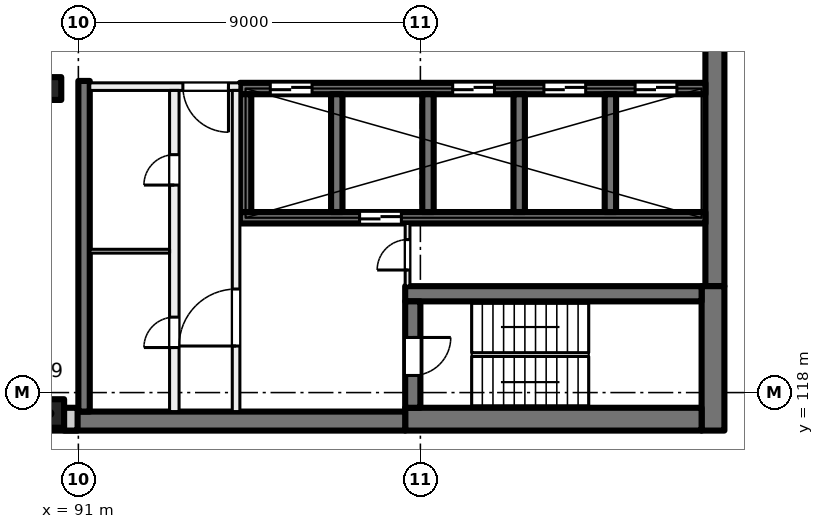
"""IFC4 building model, lengths in metres.
Left out: names, types, materials, properties, quantities, classifications, styles, units other than length and angle.
Written with IfcOpenShell. Run it as: python <this file> out.ifc"""

import sys

from ifc_helpers import new_model, si_unit, direction, frame, frame_2d, origin, origin_2d, place, context, subcontext, project, spatial, rectangle, extrude, element, fill, save


model = new_model("IFC4")
c1 = context("Model", 3, precision=1e-05, world=origin(), true_north=direction((0.0, 1.0)))
c2 = subcontext(c1, "Body", "Model", "MODEL_VIEW")
j1 = project(units=[si_unit("LENGTHUNIT", "METRE"), si_unit("PLANEANGLEUNIT", "RADIAN")], contexts=[c1])
p1 = place(None, origin())
s1 = spatial("IfcSite", under=j1, at=p1, CompositionType="ELEMENT")
p2 = place(p1, origin())
s2 = spatial("IfcBuilding", under=s1, at=p2, CompositionType="ELEMENT")
p3 = place(p2, frame((0.0, 0.0, 232.0)))
s3 = spatial("IfcBuildingStorey", under=s2, at=p3, CompositionType="ELEMENT", Elevation=232.0)
p4 = place(p3, frame((90.25, 126.0, 0.0), z_axis=(0.0, 0.0, 1.0), x_axis=(1.0, 0.0, 0.0)))
e1 = element("IfcColumn", 1, at=p4, inside=s3, PredefinedType="COLUMN", context=c2, shape_type="SweptSolid", body=[
    extrude(rectangle(XDim=0.6, YDim=0.6, at=origin_2d()), origin(), (0.0, 0.0, 1.0), 4.0),
])
p5 = place(p3, frame((90.25, 117.45, 0.0), z_axis=(0.0, 0.0, 1.0), x_axis=(1.0, 0.0, 0.0)))
e2 = element("IfcColumn", 2, at=p5, inside=s3, PredefinedType="COLUMN", context=c2, shape_type="SweptSolid", body=[
    extrude(rectangle(XDim=0.75, YDim=0.75, at=origin_2d()), origin(), (0.0, 0.0, 1.0), 4.0),
])
p6 = place(p3, frame((107.75, 135.2, 0.0), z_axis=(0.0, 0.0, 1.0), x_axis=(0.0, -1.0, 0.0)))
e3 = element("IfcWall", 3, at=p6, inside=s3, PredefinedType="SHEAR", context=c2, shape_type="SweptSolid", body=[
    extrude(rectangle(XDim=14.4, YDim=0.5, at=frame_2d((7.2, 0.0))), origin(), (0.0, 0.0, 1.0), 4.0),
])
p7 = place(p3, frame((107.7, 120.8, 0.0), z_axis=(0.0, 0.0, 1.0), x_axis=(0.0, -1.0, 0.0)))
e4 = element("IfcWall", 4, at=p7, inside=s3, PredefinedType="SHEAR", context=c2, shape_type="SweptSolid", body=[
    extrude(rectangle(XDim=3.8, YDim=0.6, at=frame_2d((1.9, 0.0))), origin(), (0.0, 0.0, 1.0), 4.0),
])
p8 = place(p3, frame((107.4, 117.3, 0.0), z_axis=(0.0, 0.0, 1.0), x_axis=(-1.0, 0.0, 0.0)))
e5 = element("IfcWall", 5, at=p8, inside=s3, PredefinedType="SHEAR", context=c2, shape_type="SweptSolid", body=[
    extrude(rectangle(XDim=7.8, YDim=0.6, at=frame_2d((3.9, 0.0))), origin(), (0.0, 0.0, 1.0), 4.0),
])
p9 = place(p3, frame((99.6, 117.25, 0.0), z_axis=(0.0, 0.0, 1.0), x_axis=(-1.0, 0.0, 0.0)))
e6 = element("IfcWall", 6, at=p9, inside=s3, PredefinedType="SHEAR", context=c2, shape_type="SweptSolid", body=[
    extrude(rectangle(XDim=8.975, YDim=0.5, at=frame_2d((4.488, 0.0))), origin(), (0.0, 0.0, 1.0), 4.0),
])
p10 = place(p3, frame((107.4, 120.6, 0.0), z_axis=(0.0, 0.0, 1.0), x_axis=(-1.0, 0.0, 0.0)))
e7 = element("IfcWall", 7, at=p10, inside=s3, PredefinedType="SHEAR", context=c2, shape_type="SweptSolid", body=[
    extrude(rectangle(XDim=7.8, YDim=0.4, at=frame_2d((3.9, 0.0))), origin(), (0.0, 0.0, 1.0), 4.0),
])
p11 = place(p3, frame((99.8, 120.4, 0.0), z_axis=(0.0, 0.0, 1.0), x_axis=(0.0, -1.0, 0.0)))
e8 = element("IfcWall", 8, at=p11, inside=s3, PredefinedType="SHEAR", context=c2, shape_type="SweptSolid", body=[
    extrude(rectangle(XDim=2.8, YDim=0.4, at=frame_2d((1.4, 0.0))), origin(), (0.0, 0.0, 1.0), 4.0),
])
p12 = place(p11, frame((0.95, 0.0, 0.0)))
e9 = element("IfcOpeningElement", 9, at=p12, cuts=e8, PredefinedType="OPENING", context=c2, shape_type="SweptSolid", body=[
    extrude(rectangle(XDim=1.0, YDim=2.1, at=frame_2d((0.5, 1.05))), frame((0.0, 0.21, 0.0), z_axis=(0.0, -1.0, 0.0), x_axis=(1.0, 0.0, 0.0)), (0.0, 0.0, 1.0), 0.42),
])
p13 = place(p3, frame((107.5, 126.0, 0.0), z_axis=(0.0, 0.0, 1.0), x_axis=(-1.0, 0.0, 0.0)))
e10 = element("IfcWall", 10, at=p13, inside=s3, PredefinedType="SHEAR", context=c2, shape_type="SweptSolid", body=[
    extrude(rectangle(XDim=12.25, YDim=0.3, at=frame_2d((6.125, 0.0))), origin(), (0.0, 0.0, 1.0), 4.0),
])
p14 = place(p13, frame((0.75, 0.0, 0.0)))
e11 = element("IfcOpeningElement", 11, at=p14, cuts=e10, PredefinedType="OPENING", context=c2, shape_type="SweptSolid", body=[
    extrude(rectangle(XDim=1.1, YDim=2.1, at=frame_2d((0.55, 1.05))), frame((0.0, 0.16, 0.0), z_axis=(0.0, -1.0, 0.0), x_axis=(1.0, 0.0, 0.0)), (0.0, 0.0, 1.0), 0.32),
])
p15 = place(p13, frame((3.15, 0.0, 0.0)))
e12 = element("IfcOpeningElement", 12, at=p15, cuts=e10, PredefinedType="OPENING", context=c2, shape_type="SweptSolid", body=[
    extrude(rectangle(XDim=1.1, YDim=2.1, at=frame_2d((0.55, 1.05))), frame((0.0, 0.16, 0.0), z_axis=(0.0, -1.0, 0.0), x_axis=(1.0, 0.0, 0.0)), (0.0, 0.0, 1.0), 0.32),
])
p16 = place(p13, frame((5.55, 0.0, 0.0)))
e13 = element("IfcOpeningElement", 13, at=p16, cuts=e10, PredefinedType="OPENING", context=c2, shape_type="SweptSolid", body=[
    extrude(rectangle(XDim=1.1, YDim=2.1, at=frame_2d((0.55, 1.05))), frame((0.0, 0.16, 0.0), z_axis=(0.0, -1.0, 0.0), x_axis=(1.0, 0.0, 0.0)), (0.0, 0.0, 1.0), 0.32),
])
p17 = place(p13, frame((10.35, 0.0, 0.0)))
e14 = element("IfcOpeningElement", 14, at=p17, cuts=e10, PredefinedType="OPENING", context=c2, shape_type="SweptSolid", body=[
    extrude(rectangle(XDim=1.1, YDim=2.1, at=frame_2d((0.55, 1.05))), frame((0.0, 0.16, 0.0), z_axis=(0.0, -1.0, 0.0), x_axis=(1.0, 0.0, 0.0)), (0.0, 0.0, 1.0), 0.32),
])
p18 = place(p3, frame((107.5, 122.6, 0.0), z_axis=(0.0, 0.0, 1.0), x_axis=(-1.0, 0.0, 0.0)))
e15 = element("IfcWall", 15, at=p18, inside=s3, PredefinedType="SHEAR", context=c2, shape_type="SweptSolid", body=[
    extrude(rectangle(XDim=12.25, YDim=0.3, at=frame_2d((6.125, 0.0))), origin(), (0.0, 0.0, 1.0), 4.0),
])
p19 = place(p18, frame((8.0, 0.0, 0.0)))
e16 = element("IfcOpeningElement", 16, at=p19, cuts=e15, PredefinedType="OPENING", context=c2, shape_type="SweptSolid", body=[
    extrude(rectangle(XDim=1.1, YDim=2.1, at=frame_2d((0.55, 1.05))), frame((0.0, 0.16, 0.0), z_axis=(0.0, -1.0, 0.0), x_axis=(1.0, 0.0, 0.0)), (0.0, 0.0, 1.0), 0.32),
])
for number, where, z_axis, x_axis in (
    (17, (105.0, 125.85, 0.0), (0.0, 0.0, 1.0), (0.0, -1.0, 0.0)),
    (18, (102.6, 125.85, 0.0), (0.0, 0.0, 1.0), (0.0, -1.0, 0.0)),
    (19, (100.2, 125.85, 0.0), (0.0, 0.0, 1.0), (0.0, -1.0, 0.0)),
    (20, (97.8, 125.85, 0.0), (0.0, 0.0, 1.0), (0.0, -1.0, 0.0)),
    (21, (95.4, 125.85, 0.0), (0.0, 0.0, 1.0), (0.0, -1.0, 0.0)),
):
    element("IfcWall", number, at=place(p3, frame(where, z_axis=z_axis, x_axis=x_axis)), inside=s3, PredefinedType="SHEAR", context=c2, shape_type="SweptSolid", body=[
        extrude(rectangle(XDim=3.1, YDim=0.3, at=frame_2d((1.55, 0.0))), origin(), (0.0, 0.0, 1.0), 4.0),
    ])
p20 = place(p3, frame((91.15, 126.2, 0.0), z_axis=(0.0, 0.0, 1.0), x_axis=(0.0, -1.0, 0.0)))
e22 = element("IfcWall", 22, at=p20, inside=s3, PredefinedType="SHEAR", context=c2, shape_type="SweptSolid", body=[
    extrude(rectangle(XDim=8.7, YDim=0.3, at=frame_2d((4.35, 0.0))), origin(), (0.0, 0.0, 1.0), 4.0),
])
p21 = place(p3, frame((90.98, 117.3, 0.0), z_axis=(0.0, 0.0, 1.0), x_axis=(-1.0, 0.0, 0.0)))
e23 = element("IfcWall", 23, at=p21, inside=s3, PredefinedType="SOLIDWALL", context=c2, shape_type="SweptSolid", body=[
    extrude(rectangle(XDim=33.745, YDim=0.6, at=frame_2d((16.873, 0.0))), origin(), (0.0, 0.0, 1.0), 3.625),
])
p22 = place(p21, frame((1.48, 0.0, 0.9)))
e24 = element("IfcOpeningElement", 24, at=p22, cuts=e23, PredefinedType="OPENING", context=c2, shape_type="SweptSolid", body=[
    extrude(rectangle(XDim=3.0, YDim=2.4, at=frame_2d((1.5, 1.2))), frame((0.0, 0.31, 0.0), z_axis=(0.0, -1.0, 0.0), x_axis=(1.0, 0.0, 0.0)), (0.0, 0.0, 1.0), 0.62),
])
p23 = place(p21, frame((5.98, 0.0, 0.9)))
e25 = element("IfcOpeningElement", 25, at=p23, cuts=e23, PredefinedType="OPENING", context=c2, shape_type="SweptSolid", body=[
    extrude(rectangle(XDim=3.0, YDim=2.4, at=frame_2d((1.5, 1.2))), frame((0.0, 0.31, 0.0), z_axis=(0.0, -1.0, 0.0), x_axis=(1.0, 0.0, 0.0)), (0.0, 0.0, 1.0), 0.62),
])
p24 = place(p21, frame((10.48, 0.0, 0.9)))
e26 = element("IfcOpeningElement", 26, at=p24, cuts=e23, PredefinedType="OPENING", context=c2, shape_type="SweptSolid", body=[
    extrude(rectangle(XDim=3.0, YDim=2.4, at=frame_2d((1.5, 1.2))), frame((0.0, 0.31, 0.0), z_axis=(0.0, -1.0, 0.0), x_axis=(1.0, 0.0, 0.0)), (0.0, 0.0, 1.0), 0.62),
])
p25 = place(p21, frame((14.98, 0.0, 0.9)))
e27 = element("IfcOpeningElement", 27, at=p25, cuts=e23, PredefinedType="OPENING", context=c2, shape_type="SweptSolid", body=[
    extrude(rectangle(XDim=3.0, YDim=2.4, at=frame_2d((1.5, 1.2))), frame((0.0, 0.31, 0.0), z_axis=(0.0, -1.0, 0.0), x_axis=(1.0, 0.0, 0.0)), (0.0, 0.0, 1.0), 0.62),
])
p26 = place(p21, frame((19.48, 0.0, 0.9)))
e28 = element("IfcOpeningElement", 28, at=p26, cuts=e23, PredefinedType="OPENING", context=c2, shape_type="SweptSolid", body=[
    extrude(rectangle(XDim=3.0, YDim=2.4, at=frame_2d((1.5, 1.2))), frame((0.0, 0.31, 0.0), z_axis=(0.0, -1.0, 0.0), x_axis=(1.0, 0.0, 0.0)), (0.0, 0.0, 1.0), 0.62),
])
p27 = place(p21, frame((23.98, 0.0, 0.9)))
e29 = element("IfcOpeningElement", 29, at=p27, cuts=e23, PredefinedType="OPENING", context=c2, shape_type="SweptSolid", body=[
    extrude(rectangle(XDim=3.0, YDim=2.4, at=frame_2d((1.5, 1.2))), frame((0.0, 0.31, 0.0), z_axis=(0.0, -1.0, 0.0), x_axis=(1.0, 0.0, 0.0)), (0.0, 0.0, 1.0), 0.62),
])
p28 = place(p21, frame((28.48, 0.0, 0.9)))
e30 = element("IfcOpeningElement", 30, at=p28, cuts=e23, PredefinedType="OPENING", context=c2, shape_type="SweptSolid", body=[
    extrude(rectangle(XDim=3.0, YDim=2.4, at=frame_2d((1.5, 1.2))), frame((0.0, 0.31, 0.0), z_axis=(0.0, -1.0, 0.0), x_axis=(1.0, 0.0, 0.0)), (0.0, 0.0, 1.0), 0.62),
])
p29 = place(p3, frame((95.25, 126.05, 0.0), z_axis=(0.0, 0.0, 1.0), x_axis=(-1.0, 0.0, 0.0)))
e31 = element("IfcWall", 31, at=p29, inside=s3, PredefinedType="PARTITIONING", context=c2, shape_type="SweptSolid", body=[
    extrude(rectangle(XDim=3.95, YDim=0.2, at=frame_2d((1.975, 0.0))), origin(), (0.0, 0.0, 1.0), 3.625),
])
p30 = place(p29, frame((0.3, 0.0, 0.0)))
e32 = element("IfcOpeningElement", 32, at=p30, cuts=e31, PredefinedType="OPENING", context=c2, shape_type="SweptSolid", body=[
    extrude(rectangle(XDim=1.2, YDim=2.1, at=frame_2d((0.6, 1.05))), frame((0.0, 0.11, 0.0), z_axis=(0.0, -1.0, 0.0), x_axis=(1.0, 0.0, 0.0)), (0.0, 0.0, 1.0), 0.22),
])
p31 = place(p3, frame((95.15, 117.5, 0.0), z_axis=(0.0, 0.0, 1.0), x_axis=(0.0, 1.0, 0.0)))
e33 = element("IfcWall", 33, at=p31, inside=s3, PredefinedType="PARTITIONING", context=c2, shape_type="SweptSolid", body=[
    extrude(rectangle(XDim=8.45, YDim=0.2, at=frame_2d((4.225, 0.0))), origin(), (0.0, 0.0, 1.0), 3.625),
])
p32 = place(p31, frame((1.725, 0.0, 0.0)))
e34 = element("IfcOpeningElement", 34, at=p32, cuts=e33, PredefinedType="OPENING", context=c2, shape_type="SweptSolid", body=[
    extrude(rectangle(XDim=1.5, YDim=2.1, at=frame_2d((0.75, 1.05))), frame((0.0, 0.11, 0.0), z_axis=(0.0, -1.0, 0.0), x_axis=(1.0, 0.0, 0.0)), (0.0, 0.0, 1.0), 0.22),
])
p33 = place(p3, frame((93.525, 117.5, 0.0), z_axis=(0.0, 0.0, 1.0), x_axis=(0.0, 1.0, 0.0)))
e35 = element("IfcWall", 35, at=p33, inside=s3, PredefinedType="PARTITIONING", context=c2, shape_type="SweptSolid", body=[
    extrude(rectangle(XDim=8.45, YDim=0.25, at=frame_2d((4.225, 0.0))), origin(), (0.0, 0.0, 1.0), 3.625),
])
p34 = place(p33, frame((5.96, 0.0, 0.0)))
e36 = element("IfcOpeningElement", 36, at=p34, cuts=e35, PredefinedType="OPENING", context=c2, shape_type="SweptSolid", body=[
    extrude(rectangle(XDim=0.8, YDim=2.1, at=frame_2d((0.4, 1.05))), frame((0.0, 0.135, 0.0), z_axis=(0.0, -1.0, 0.0), x_axis=(1.0, 0.0, 0.0)), (0.0, 0.0, 1.0), 0.27),
])
p35 = place(p33, frame((1.685, 0.0, 0.0)))
e37 = element("IfcOpeningElement", 37, at=p35, cuts=e35, PredefinedType="OPENING", context=c2, shape_type="SweptSolid", body=[
    extrude(rectangle(XDim=0.8, YDim=2.1, at=frame_2d((0.4, 1.05))), frame((0.0, 0.135, 0.0), z_axis=(0.0, -1.0, 0.0), x_axis=(1.0, 0.0, 0.0)), (0.0, 0.0, 1.0), 0.27),
])
p36 = place(p3, frame((99.663, 120.8, 0.0), z_axis=(0.0, 0.0, 1.0), x_axis=(0.0, 1.0, 0.0)))
e38 = element("IfcWall", 38, at=p36, inside=s3, PredefinedType="PARTITIONING", context=c2, shape_type="SweptSolid", body=[
    extrude(rectangle(XDim=1.65, YDim=0.125, at=frame_2d((0.825, 0.0))), origin(), (0.0, 0.0, 1.0), 3.625),
])
p37 = place(p36, frame((0.425, 0.0, 0.0)))
e39 = element("IfcOpeningElement", 39, at=p37, cuts=e38, PredefinedType="OPENING", context=c2, shape_type="SweptSolid", body=[
    extrude(rectangle(XDim=0.8, YDim=2.1, at=frame_2d((0.4, 1.05))), frame((0.0, 0.073, 0.0), z_axis=(0.0, -1.0, 0.0), x_axis=(1.0, 0.0, 0.0)), (0.0, 0.0, 1.0), 0.145),
])
p38 = place(p3, frame((93.4, 121.72, 0.0), z_axis=(0.0, 0.0, 1.0), x_axis=(-1.0, 0.0, 0.0)))
e40 = element("IfcWall", 40, at=p38, inside=s3, PredefinedType="PARTITIONING", context=c2, shape_type="SweptSolid", body=[
    extrude(rectangle(XDim=2.1, YDim=0.1, at=frame_2d((1.05, 0.0))), origin(), (0.0, 0.0, 1.0), 3.625),
])
p39 = place(p14, origin())
e41 = element("IfcDoor", 41, at=p39, inside=s3, OperationType="DOUBLE_DOOR_SLIDING", PredefinedType="DOOR", context=c2, shape_type="SweptSolid", body=[
    extrude(rectangle(XDim=1.1, YDim=2.1, at=frame_2d((0.55, 1.05))), frame((0.0, 0.025, 0.0), z_axis=(0.0, -1.0, 0.0), x_axis=(1.0, 0.0, 0.0)), (0.0, 0.0, 1.0), 0.05),
])
fill(e11, e41)
p40 = place(p15, origin())
e42 = element("IfcDoor", 42, at=p40, inside=s3, OperationType="DOUBLE_DOOR_SLIDING", PredefinedType="DOOR", context=c2, shape_type="SweptSolid", body=[
    extrude(rectangle(XDim=1.1, YDim=2.1, at=frame_2d((0.55, 1.05))), frame((0.0, 0.025, 0.0), z_axis=(0.0, -1.0, 0.0), x_axis=(1.0, 0.0, 0.0)), (0.0, 0.0, 1.0), 0.05),
])
fill(e12, e42)
p41 = place(p16, origin())
e43 = element("IfcDoor", 43, at=p41, inside=s3, OperationType="DOUBLE_DOOR_SLIDING", PredefinedType="DOOR", context=c2, shape_type="SweptSolid", body=[
    extrude(rectangle(XDim=1.1, YDim=2.1, at=frame_2d((0.55, 1.05))), frame((0.0, 0.025, 0.0), z_axis=(0.0, -1.0, 0.0), x_axis=(1.0, 0.0, 0.0)), (0.0, 0.0, 1.0), 0.05),
])
fill(e13, e43)
p42 = place(p17, origin())
e44 = element("IfcDoor", 44, at=p42, inside=s3, OperationType="DOUBLE_DOOR_SLIDING", PredefinedType="DOOR", context=c2, shape_type="SweptSolid", body=[
    extrude(rectangle(XDim=1.1, YDim=2.1, at=frame_2d((0.55, 1.05))), frame((0.0, 0.025, 0.0), z_axis=(0.0, -1.0, 0.0), x_axis=(1.0, 0.0, 0.0)), (0.0, 0.0, 1.0), 0.05),
])
fill(e14, e44)
p43 = place(p30, origin())
e45 = element("IfcDoor", 45, at=p43, inside=s3, OperationType="DOUBLE_DOOR_SINGLE_SWING", PredefinedType="DOOR", context=c2, shape_type="SweptSolid", body=[
    extrude(rectangle(XDim=1.2, YDim=2.1, at=frame_2d((0.6, 1.05))), frame((0.0, 0.025, 0.0), z_axis=(0.0, -1.0, 0.0), x_axis=(1.0, 0.0, 0.0)), (0.0, 0.0, 1.0), 0.05),
])
fill(e32, e45)
p44 = place(p32, origin())
e46 = element("IfcDoor", 46, at=p44, inside=s3, OperationType="DOUBLE_DOOR_SINGLE_SWING", PredefinedType="DOOR", context=c2, shape_type="SweptSolid", body=[
    extrude(rectangle(XDim=1.5, YDim=2.1, at=frame_2d((0.75, 1.05))), frame((0.0, 0.025, 0.0), z_axis=(0.0, -1.0, 0.0), x_axis=(1.0, 0.0, 0.0)), (0.0, 0.0, 1.0), 0.05),
])
fill(e34, e46)
p45 = place(p12, origin())
e47 = element("IfcDoor", 47, at=p45, inside=s3, OperationType="SINGLE_SWING_LEFT", PredefinedType="DOOR", context=c2, shape_type="SweptSolid", body=[
    extrude(rectangle(XDim=1.0, YDim=2.1, at=frame_2d((0.5, 1.05))), frame((0.0, 0.025, 0.0), z_axis=(0.0, -1.0, 0.0), x_axis=(1.0, 0.0, 0.0)), (0.0, 0.0, 1.0), 0.05),
])
fill(e9, e47)
p46 = place(p37, origin())
e48 = element("IfcDoor", 48, at=p46, inside=s3, OperationType="SINGLE_SWING_RIGHT", PredefinedType="DOOR", context=c2, shape_type="SweptSolid", body=[
    extrude(rectangle(XDim=0.8, YDim=2.1, at=frame_2d((0.4, 1.05))), frame((0.0, 0.025, 0.0), z_axis=(0.0, -1.0, 0.0), x_axis=(1.0, 0.0, 0.0)), (0.0, 0.0, 1.0), 0.05),
])
fill(e39, e48)
p47 = place(p34, origin())
e49 = element("IfcDoor", 49, at=p47, inside=s3, OperationType="SINGLE_SWING_LEFT", PredefinedType="DOOR", context=c2, shape_type="SweptSolid", body=[
    extrude(rectangle(XDim=0.8, YDim=2.1, at=frame_2d((0.4, 1.05))), frame((0.0, 0.025, 0.0), z_axis=(0.0, -1.0, 0.0), x_axis=(1.0, 0.0, 0.0)), (0.0, 0.0, 1.0), 0.05),
])
fill(e36, e49)
p48 = place(p35, origin())
e50 = element("IfcDoor", 50, at=p48, inside=s3, OperationType="SINGLE_SWING_RIGHT", PredefinedType="DOOR", context=c2, shape_type="SweptSolid", body=[
    extrude(rectangle(XDim=0.8, YDim=2.1, at=frame_2d((0.4, 1.05))), frame((0.0, 0.025, 0.0), z_axis=(0.0, -1.0, 0.0), x_axis=(1.0, 0.0, 0.0)), (0.0, 0.0, 1.0), 0.05),
])
fill(e37, e50)
p49 = place(p19, origin())
e51 = element("IfcDoor", 51, at=p49, inside=s3, OperationType="DOUBLE_DOOR_SLIDING", PredefinedType="DOOR", context=c2, shape_type="SweptSolid", body=[
    extrude(rectangle(XDim=1.1, YDim=2.1, at=frame_2d((0.55, 1.05))), frame((0.0, 0.025, 0.0), z_axis=(0.0, -1.0, 0.0), x_axis=(1.0, 0.0, 0.0)), (0.0, 0.0, 1.0), 0.05),
])
fill(e16, e51)
save(model, sys.argv[1])
